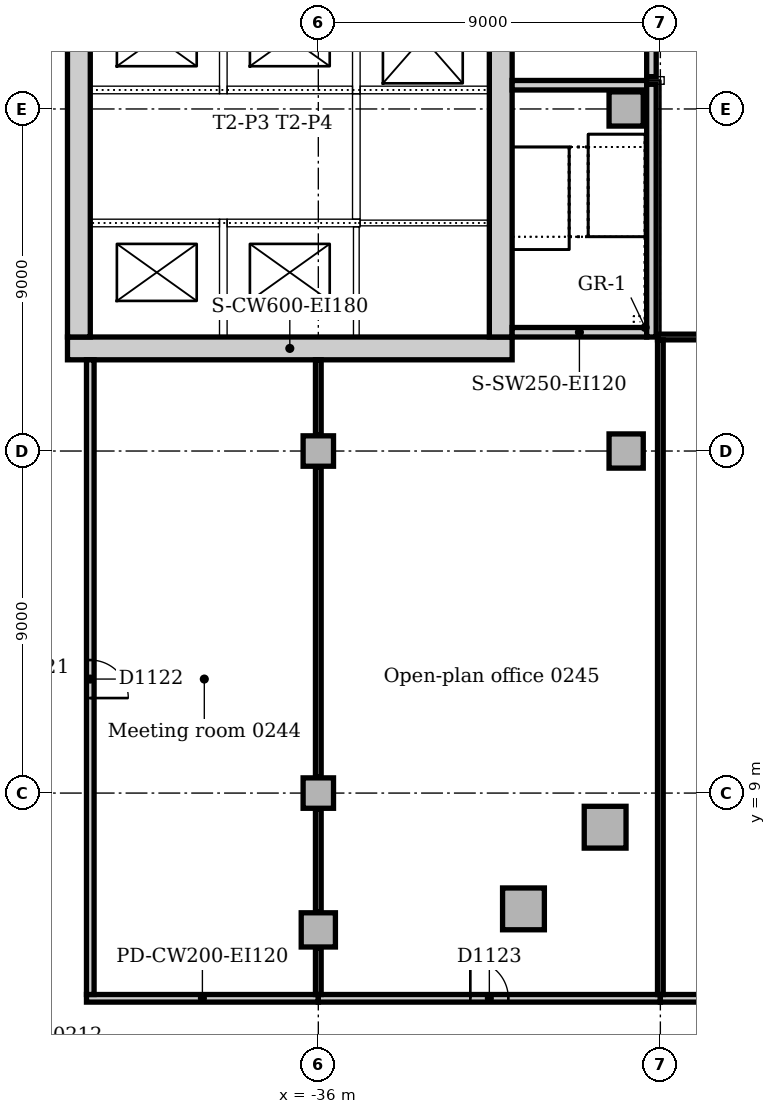
"""IFC4 building model, lengths in metres.
Left out: names, types, materials, properties, quantities, classifications, styles, units other than length and angle.
Written with IfcOpenShell. Run it as: python <this file> out.ifc"""

import sys

from ifc_helpers import new_model, si_unit, direction, frame, frame_2d, origin, origin_2d, place, context, subcontext, project, spatial, rectangle, extrude, element, fill, save


model = new_model("IFC4")
c1 = context("Model", 3, precision=1e-05, world=origin(), true_north=direction((0.0, 1.0)))
c2 = subcontext(c1, "Body", "Model", "MODEL_VIEW")
j1 = project(units=[si_unit("LENGTHUNIT", "METRE"), si_unit("PLANEANGLEUNIT", "RADIAN")], contexts=[c1])
p1 = place(None, origin())
s1 = spatial("IfcSite", under=j1, at=p1, CompositionType="ELEMENT")
p2 = place(p1, origin())
s2 = spatial("IfcBuilding", under=s1, at=p2, CompositionType="ELEMENT")
p3 = place(p2, frame((0.0, 0.0, 11.0)))
s3 = spatial("IfcBuildingStorey", under=s2, at=p3, CompositionType="ELEMENT", Elevation=11.0)
p4 = place(p3, frame((-42.6, 20.7, 0.0), z_axis=(0.0, 0.0, 1.0), x_axis=(1.0, 0.0, 0.0)))
e1 = element("IfcWall", 1, at=p4, inside=s3, PredefinedType="SOLIDWALL", context=c2, shape_type="SweptSolid", body=[
    extrude(rectangle(XDim=11.7, YDim=0.6, at=frame_2d((5.85, 0.0))), origin(), (0.0, 0.0, 1.0), 5.0),
])
p5 = place(p3, frame((-31.2, 21.0, 0.0), z_axis=(0.0, 0.0, 1.0), x_axis=(0.0, 1.0, 0.0)))
e2 = element("IfcWall", 2, at=p5, inside=s3, PredefinedType="SOLIDWALL", context=c2, shape_type="SweptSolid", body=[
    extrude(rectangle(XDim=9.5, YDim=0.6, at=frame_2d((4.75, 0.0))), origin(), (0.0, 0.0, 1.0), 5.0),
])
p6 = place(p5, frame((5.25, 0.0, 0.0)))
e3 = element("IfcOpeningElement", 3, at=p6, cuts=e2, PredefinedType="OPENING", context=c2, shape_type="SweptSolid", body=[
    extrude(rectangle(XDim=1.0, YDim=2.1, at=frame_2d((0.5, 1.05))), frame((0.0, 0.31, 0.0), z_axis=(0.0, -1.0, 0.0), x_axis=(1.0, 0.0, 0.0)), (0.0, 0.0, 1.0), 0.62),
])
p7 = place(p3, frame((-42.3, 30.5, 0.0), z_axis=(0.0, 0.0, 1.0), x_axis=(0.0, -1.0, 0.0)))
e4 = element("IfcWall", 4, at=p7, inside=s3, PredefinedType="SOLIDWALL", context=c2, shape_type="SweptSolid", body=[
    extrude(rectangle(XDim=9.5, YDim=0.6, at=frame_2d((4.75, 0.0))), origin(), (0.0, 0.0, 1.0), 5.0),
])
p8 = place(p7, frame((3.85, 0.0, 0.0)))
e5 = element("IfcOpeningElement", 5, at=p8, cuts=e4, PredefinedType="OPENING", context=c2, shape_type="SweptSolid", body=[
    extrude(rectangle(XDim=1.8, YDim=2.1, at=frame_2d((0.9, 1.05))), frame((0.0, 0.31, 0.0), z_axis=(0.0, -1.0, 0.0), x_axis=(1.0, 0.0, 0.0)), (0.0, 0.0, 1.0), 0.62),
])
p9 = place(p3, frame((-30.9, 21.125, 0.0), z_axis=(0.0, 0.0, 1.0), x_axis=(1.0, 0.0, 0.0)))
e6 = element("IfcWall", 6, at=p9, inside=s3, PredefinedType="SOLIDWALL", context=c2, shape_type="SweptSolid", body=[
    extrude(rectangle(XDim=3.54, YDim=0.25, at=frame_2d((1.77, 0.0))), origin(), (0.0, 0.0, 1.0), 5.0),
])
p10 = place(p3, frame((-27.36, 27.625, 0.0), z_axis=(0.0, 0.0, 1.0), x_axis=(-1.0, 0.0, 0.0)))
e7 = element("IfcWall", 7, at=p10, inside=s3, PredefinedType="SOLIDWALL", context=c2, shape_type="SweptSolid", body=[
    extrude(rectangle(XDim=3.54, YDim=0.25, at=frame_2d((1.77, 0.0))), origin(), (0.0, 0.0, 1.0), 5.0),
])
p11 = place(p10, frame((1.69, 0.0, 0.0)))
e8 = element("IfcOpeningElement", 8, at=p11, cuts=e7, PredefinedType="OPENING", context=c2, shape_type="SweptSolid", body=[
    extrude(rectangle(XDim=1.1, YDim=2.1, at=frame_2d((0.55, 1.05))), frame((0.0, 0.135, 0.0), z_axis=(0.0, -1.0, 0.0), x_axis=(1.0, 0.0, 0.0)), (0.0, 0.0, 1.0), 0.27),
])
p12 = place(p3, frame((-27.235, 21.0, 0.0), z_axis=(0.0, 0.0, 1.0), x_axis=(0.0, 1.0, 0.0)))
e9 = element("IfcWall", 9, at=p12, inside=s3, PredefinedType="SOLIDWALL", context=c2, shape_type="SweptSolid", body=[
    extrude(rectangle(XDim=6.65, YDim=0.25, at=frame_2d((3.325, 0.0))), origin(), (0.0, 0.0, 1.0), 5.0),
])
p13 = place(p3, frame((-27.235, 27.85, 0.0), z_axis=(0.0, 0.0, 1.0), x_axis=(0.0, 1.0, 0.0)))
e10 = element("IfcWall", 10, at=p13, inside=s3, PredefinedType="SOLIDWALL", context=c2, shape_type="SweptSolid", body=[
    extrude(rectangle(XDim=7.3, YDim=0.25, at=frame_2d((3.65, 0.0))), origin(), (0.0, 0.0, 1.0), 5.0),
])
for number, where, z_axis, x_axis in (
    (11, (-30.602, 5.953, 0.0), (0.0, 0.0, 1.0), (1.0, 0.0, 0.0)),
    (12, (-28.453, 8.102, 0.0), (0.0, 0.0, 1.0), (1.0, 0.0, 0.0)),
):
    element("IfcColumn", number, at=place(p3, frame(where, z_axis=z_axis, x_axis=x_axis)), inside=s3, PredefinedType="COLUMN", context=c2, shape_type="SweptSolid", body=[
        extrude(rectangle(XDim=1.1, YDim=1.1, at=origin_2d()), origin(), (0.0, 0.0, 1.0), 4.7),
    ])
for number, where, z_axis, x_axis in (
    (13, (-36.0, 5.4, 0.0), (0.0, 0.0, 1.0), (1.0, 0.0, 0.0)),
    (14, (-27.9, 18.0, 0.0), (0.0, 0.0, 1.0), (1.0, 0.0, 0.0)),
):
    element("IfcColumn", number, at=place(p3, frame(where, z_axis=z_axis, x_axis=x_axis)), inside=s3, PredefinedType="COLUMN", context=c2, shape_type="SweptSolid", body=[
        extrude(rectangle(XDim=0.9, YDim=0.9, at=origin_2d()), origin(), (0.0, 0.0, 1.0), 4.7),
    ])
p14 = place(p3, frame((-27.9, 27.0, 0.0), z_axis=(0.0, 0.0, 1.0), x_axis=(1.0, 0.0, 0.0)))
e15 = element("IfcColumn", 15, at=p14, inside=s3, PredefinedType="COLUMN", context=c2, shape_type="SweptSolid", body=[
    extrude(rectangle(XDim=0.9, YDim=0.9, at=origin_2d()), origin(), (0.0, 0.0, 1.0), 5.0),
])
for number, where, z_axis, x_axis in (
    (16, (-36.0, 9.0, 0.0), (0.0, 0.0, 1.0), (1.0, 0.0, 0.0)),
    (17, (-36.0, 18.0, 0.0), (0.0, 0.0, 1.0), (1.0, 0.0, 0.0)),
):
    element("IfcColumn", number, at=place(p3, frame(where, z_axis=z_axis, x_axis=x_axis)), inside=s3, PredefinedType="COLUMN", context=c2, shape_type="SweptSolid", body=[
        extrude(rectangle(XDim=0.8, YDim=0.8, at=origin_2d()), origin(), (0.0, 0.0, 1.0), 4.7),
    ])
p15 = place(p3, frame((-42.1, 3.6, 0.0), z_axis=(0.0, 0.0, 1.0), x_axis=(1.0, 0.0, 0.0)))
e18 = element("IfcWall", 18, at=p15, inside=s3, PredefinedType="PARTITIONING", context=c2, shape_type="SweptSolid", body=[
    extrude(rectangle(XDim=6.1, YDim=0.2, at=frame_2d((3.05, 0.0))), origin(), (0.0, 0.0, 1.0), 4.7),
])
p16 = place(p3, frame((-36.0, 3.6, 0.0), z_axis=(0.0, 0.0, 1.0), x_axis=(1.0, 0.0, 0.0)))
e19 = element("IfcWall", 19, at=p16, inside=s3, PredefinedType="PARTITIONING", context=c2, shape_type="SweptSolid", body=[
    extrude(rectangle(XDim=9.0, YDim=0.2, at=frame_2d((4.5, 0.0))), origin(), (0.0, 0.0, 1.0), 4.7),
])
p17 = place(p16, frame((4.0, 0.0, 0.0)))
e20 = element("IfcOpeningElement", 20, at=p17, cuts=e19, PredefinedType="OPENING", context=c2, shape_type="SweptSolid", body=[
    extrude(rectangle(XDim=1.0, YDim=2.1, at=frame_2d((0.5, 1.05))), frame((0.0, 0.11, 0.0), z_axis=(0.0, -1.0, 0.0), x_axis=(1.0, 0.0, 0.0)), (0.0, 0.0, 1.0), 0.22),
])
p18 = place(p3, frame((-42.0, 3.7, 0.0), z_axis=(0.0, 0.0, 1.0), x_axis=(0.0, 1.0, 0.0)))
e21 = element("IfcWall", 21, at=p18, inside=s3, PredefinedType="PARTITIONING", context=c2, shape_type="SweptSolid", body=[
    extrude(rectangle(XDim=16.7, YDim=0.2, at=frame_2d((8.35, 0.0))), origin(), (0.0, 0.0, 1.0), 4.7),
])
p19 = place(p18, frame((7.8, 0.0, 0.0)))
e22 = element("IfcOpeningElement", 22, at=p19, cuts=e21, PredefinedType="OPENING", context=c2, shape_type="SweptSolid", body=[
    extrude(rectangle(XDim=1.0, YDim=2.1, at=frame_2d((0.5, 1.05))), frame((0.0, 0.11, 0.0), z_axis=(0.0, -1.0, 0.0), x_axis=(1.0, 0.0, 0.0)), (0.0, 0.0, 1.0), 0.22),
])
p20 = place(p3, frame((-27.0, 3.6, 0.0), z_axis=(0.0, 0.0, 1.0), x_axis=(1.0, 0.0, 0.0)))
e23 = element("IfcWall", 23, at=p20, inside=s3, PredefinedType="PARTITIONING", context=c2, shape_type="SweptSolid", body=[
    extrude(rectangle(XDim=9.0, YDim=0.2, at=frame_2d((4.5, 0.0))), origin(), (0.0, 0.0, 1.0), 4.7),
])
p21 = place(p20, frame((4.0, 0.0, 0.0)))
e24 = element("IfcOpeningElement", 24, at=p21, cuts=e23, PredefinedType="OPENING", context=c2, shape_type="SweptSolid", body=[
    extrude(rectangle(XDim=1.0, YDim=2.1, at=frame_2d((0.5, 1.05))), frame((0.0, 0.11, 0.0), z_axis=(0.0, -1.0, 0.0), x_axis=(1.0, 0.0, 0.0)), (0.0, 0.0, 1.0), 0.22),
])
p22 = place(p3, frame((-27.075, 21.0, 0.0), z_axis=(0.0, 0.0, 1.0), x_axis=(1.0, 0.0, 0.0)))
e25 = element("IfcWall", 25, at=p22, inside=s3, PredefinedType="PARTITIONING", context=c2, shape_type="SweptSolid", body=[
    extrude(rectangle(XDim=9.075, YDim=0.15, at=frame_2d((4.537, 0.0))), origin(), (0.0, 0.0, 1.0), 4.7),
])
p23 = place(p3, frame((-27.0, 3.7, 0.0), z_axis=(0.0, 0.0, 1.0), x_axis=(0.0, 1.0, 0.0)))
e26 = element("IfcWall", 26, at=p23, inside=s3, PredefinedType="PARTITIONING", context=c2, shape_type="SweptSolid", body=[
    extrude(rectangle(XDim=17.225, YDim=0.15, at=frame_2d((8.613, 0.0))), origin(), (0.0, 0.0, 1.0), 4.7),
])
p24 = place(p3, frame((-36.0, 3.7, 0.0), z_axis=(0.0, 0.0, 1.0), x_axis=(0.0, 1.0, 0.0)))
e27 = element("IfcWall", 27, at=p24, inside=s3, PredefinedType="PARTITIONING", context=c2, shape_type="SweptSolid", body=[
    extrude(rectangle(XDim=1.23, YDim=0.15, at=frame_2d((0.615, 0.0))), origin(), (0.0, 0.0, 1.0), 4.7),
])
p25 = place(p3, frame((-36.0, 5.87, 0.0), z_axis=(0.0, 0.0, 1.0), x_axis=(0.0, 1.0, 0.0)))
e28 = element("IfcWall", 28, at=p25, inside=s3, PredefinedType="PARTITIONING", context=c2, shape_type="SweptSolid", body=[
    extrude(rectangle(XDim=2.71, YDim=0.15, at=frame_2d((1.355, 0.0))), origin(), (0.0, 0.0, 1.0), 4.7),
])
p26 = place(p3, frame((-36.0, 9.42, 0.0), z_axis=(0.0, 0.0, 1.0), x_axis=(0.0, 1.0, 0.0)))
e29 = element("IfcWall", 29, at=p26, inside=s3, PredefinedType="PARTITIONING", context=c2, shape_type="SweptSolid", body=[
    extrude(rectangle(XDim=8.16, YDim=0.15, at=frame_2d((4.08, 0.0))), origin(), (0.0, 0.0, 1.0), 4.7),
])
p27 = place(p3, frame((-36.0, 18.42, 0.0), z_axis=(0.0, 0.0, 1.0), x_axis=(0.0, 1.0, 0.0)))
e30 = element("IfcWall", 30, at=p27, inside=s3, PredefinedType="PARTITIONING", context=c2, shape_type="SweptSolid", body=[
    extrude(rectangle(XDim=1.98, YDim=0.15, at=frame_2d((0.99, 0.0))), origin(), (0.0, 0.0, 1.0), 4.7),
])
p28 = place(p3, frame((-38.5, 21.0, 0.0), z_axis=(0.0, 0.0, 1.0), x_axis=(0.0, 1.0, 0.0)))
e31 = element("IfcWall", 31, at=p28, inside=s3, PredefinedType="SOLIDWALL", context=c2, shape_type="SweptSolid", body=[
    extrude(rectangle(XDim=3.1, YDim=0.2, at=frame_2d((1.55, 0.0))), origin(), (0.0, 0.0, 1.0), 5.0),
])
p29 = place(p3, frame((-38.6, 24.0, 0.0), z_axis=(0.0, 0.0, 1.0), x_axis=(-1.0, 0.0, 0.0)))
e32 = element("IfcWall", 32, at=p29, inside=s3, PredefinedType="SOLIDWALL", context=c2, shape_type="SweptSolid", body=[
    extrude(rectangle(XDim=3.4, YDim=0.2, at=frame_2d((1.7, 0.0))), origin(), (0.0, 0.0, 1.0), 5.0),
])
p30 = place(p29, frame((0.8, 0.0, 0.0)))
e33 = element("IfcOpeningElement", 33, at=p30, cuts=e32, PredefinedType="OPENING", context=c2, shape_type="SweptSolid", body=[
    extrude(rectangle(XDim=1.1, YDim=2.1, at=frame_2d((0.55, 1.05))), frame((0.0, 0.11, 0.0), z_axis=(0.0, -1.0, 0.0), x_axis=(1.0, 0.0, 0.0)), (0.0, 0.0, 1.0), 0.22),
])
p31 = place(p3, frame((-34.9, 24.0, 0.0), z_axis=(0.0, 0.0, 1.0), x_axis=(-1.0, 0.0, 0.0)))
e34 = element("IfcWall", 34, at=p31, inside=s3, PredefinedType="SOLIDWALL", context=c2, shape_type="SweptSolid", body=[
    extrude(rectangle(XDim=3.5, YDim=0.2, at=frame_2d((1.75, 0.0))), origin(), (0.0, 0.0, 1.0), 5.0),
])
p32 = place(p31, frame((1.3, 0.0, 0.0)))
e35 = element("IfcOpeningElement", 35, at=p32, cuts=e34, PredefinedType="OPENING", context=c2, shape_type="SweptSolid", body=[
    extrude(rectangle(XDim=1.1, YDim=2.1, at=frame_2d((0.55, 1.05))), frame((0.0, 0.11, 0.0), z_axis=(0.0, -1.0, 0.0), x_axis=(1.0, 0.0, 0.0)), (0.0, 0.0, 1.0), 0.22),
])
p33 = place(p3, frame((-38.5, 27.4, 0.0), z_axis=(0.0, 0.0, 1.0), x_axis=(0.0, 1.0, 0.0)))
e36 = element("IfcWall", 36, at=p33, inside=s3, PredefinedType="SOLIDWALL", context=c2, shape_type="SweptSolid", body=[
    extrude(rectangle(XDim=2.85, YDim=0.2, at=frame_2d((1.425, 0.0))), origin(), (0.0, 0.0, 1.0), 5.0),
])
p34 = place(p3, frame((-42.0, 27.5, 0.0), z_axis=(0.0, 0.0, 1.0), x_axis=(1.0, 0.0, 0.0)))
e37 = element("IfcWall", 37, at=p34, inside=s3, PredefinedType="SOLIDWALL", context=c2, shape_type="SweptSolid", body=[
    extrude(rectangle(XDim=3.4, YDim=0.2, at=frame_2d((1.7, 0.0))), origin(), (0.0, 0.0, 1.0), 5.0),
])
p35 = place(p34, frame((1.5, 0.0, 0.0)))
e38 = element("IfcOpeningElement", 38, at=p35, cuts=e37, PredefinedType="OPENING", context=c2, shape_type="SweptSolid", body=[
    extrude(rectangle(XDim=1.1, YDim=2.1, at=frame_2d((0.55, 1.05))), frame((0.0, 0.11, 0.0), z_axis=(0.0, -1.0, 0.0), x_axis=(1.0, 0.0, 0.0)), (0.0, 0.0, 1.0), 0.22),
])
p36 = place(p3, frame((-35.0, 27.4, 0.0), z_axis=(0.0, 0.0, 1.0), x_axis=(0.0, 1.0, 0.0)))
e39 = element("IfcWall", 39, at=p36, inside=s3, PredefinedType="SOLIDWALL", context=c2, shape_type="SweptSolid", body=[
    extrude(rectangle(XDim=2.85, YDim=0.2, at=frame_2d((1.425, 0.0))), origin(), (0.0, 0.0, 1.0), 5.0),
])
p37 = place(p3, frame((-38.4, 27.5, 0.0), z_axis=(0.0, 0.0, 1.0), x_axis=(1.0, 0.0, 0.0)))
e40 = element("IfcWall", 40, at=p37, inside=s3, PredefinedType="SOLIDWALL", context=c2, shape_type="SweptSolid", body=[
    extrude(rectangle(XDim=3.3, YDim=0.2, at=frame_2d((1.65, 0.0))), origin(), (0.0, 0.0, 1.0), 5.0),
])
p38 = place(p37, frame((1.1, 0.0, 0.0)))
e41 = element("IfcOpeningElement", 41, at=p38, cuts=e40, PredefinedType="OPENING", context=c2, shape_type="SweptSolid", body=[
    extrude(rectangle(XDim=1.1, YDim=2.1, at=frame_2d((0.55, 1.05))), frame((0.0, 0.11, 0.0), z_axis=(0.0, -1.0, 0.0), x_axis=(1.0, 0.0, 0.0)), (0.0, 0.0, 1.0), 0.22),
])
p39 = place(p3, frame((-34.9, 27.5, 0.0), z_axis=(0.0, 0.0, 1.0), x_axis=(1.0, 0.0, 0.0)))
e42 = element("IfcWall", 42, at=p39, inside=s3, PredefinedType="SOLIDWALL", context=c2, shape_type="SweptSolid", body=[
    extrude(rectangle(XDim=3.4, YDim=0.2, at=frame_2d((1.7, 0.0))), origin(), (0.0, 0.0, 1.0), 5.0),
])
p40 = place(p39, frame((1.1, 0.0, 0.0)))
e43 = element("IfcOpeningElement", 43, at=p40, cuts=e42, PredefinedType="OPENING", context=c2, shape_type="SweptSolid", body=[
    extrude(rectangle(XDim=1.1, YDim=2.1, at=frame_2d((0.55, 1.05))), frame((0.0, 0.11, 0.0), z_axis=(0.0, -1.0, 0.0), x_axis=(1.0, 0.0, 0.0)), (0.0, 0.0, 1.0), 0.22),
])
p41 = place(p3, frame((-35.0, 24.1, 0.0), z_axis=(0.0, 0.0, 1.0), x_axis=(0.0, 1.0, 0.0)))
e44 = element("IfcWall", 44, at=p41, inside=s3, PredefinedType="SOLIDWALL", context=c2, shape_type="SweptSolid", body=[
    extrude(rectangle(XDim=3.3, YDim=0.2, at=frame_2d((1.65, 0.0))), origin(), (0.0, 0.0, 1.0), 5.0),
])
p42 = place(p41, frame((1.15, 0.0, 0.0)))
e45 = element("IfcOpeningElement", 45, at=p42, cuts=e44, PredefinedType="OPENING", context=c2, shape_type="SweptSolid", body=[
    extrude(rectangle(XDim=1.0, YDim=2.1, at=frame_2d((0.5, 1.05))), frame((0.0, 0.11, 0.0), z_axis=(0.0, -1.0, 0.0), x_axis=(1.0, 0.0, 0.0)), (0.0, 0.0, 1.0), 0.22),
])
p43 = place(p3, frame((-27.36, 27.75, 0.0), z_axis=(0.0, 0.0, 1.0), x_axis=(1.0, 0.0, 0.0)))
e46 = element("IfcWall", 46, at=p43, inside=s3, PredefinedType="SOLIDWALL", context=c2, shape_type="SweptSolid", body=[
    extrude(rectangle(XDim=0.46, YDim=0.2, at=frame_2d((0.23, 0.0))), origin(), (0.0, 0.0, 1.0), 5.0),
])
p44 = place(p3, frame((-35.0, 21.0, 0.0), z_axis=(0.0, 0.0, 1.0), x_axis=(0.0, 1.0, 0.0)))
e47 = element("IfcWall", 47, at=p44, inside=s3, PredefinedType="SOLIDWALL", context=c2, shape_type="SweptSolid", body=[
    extrude(rectangle(XDim=2.9, YDim=0.15, at=frame_2d((1.45, 0.0))), origin(), (0.0, 0.0, 1.0), 5.0),
])
p45 = place(p3, frame((-31.5, 24.0, 0.0), z_axis=(0.0, 0.0, 1.0), x_axis=(-1.0, 0.0, 0.0)))
e48 = element("IfcWall", 48, at=p45, inside=s3, PredefinedType="SOLIDWALL", context=c2, shape_type="SweptSolid", body=[
    extrude(rectangle(XDim=3.4, YDim=0.15, at=frame_2d((1.7, 0.0))), origin(), (0.0, 0.0, 1.0), 5.0),
])
p46 = place(p19, frame((1.0, 0.0, 0.0), z_axis=(0.0, 0.0, 1.0), x_axis=(-1.0, 0.0, 0.0)))
e49 = element("IfcDoor", 49, at=p46, inside=s3, OperationType="SINGLE_SWING_RIGHT", PredefinedType="DOOR", context=c2, shape_type="SweptSolid", body=[
    extrude(rectangle(XDim=1.0, YDim=2.1, at=frame_2d((0.5, 1.05))), frame((0.0, 0.025, 0.0), z_axis=(0.0, -1.0, 0.0), x_axis=(1.0, 0.0, 0.0)), (0.0, 0.0, 1.0), 0.05),
])
fill(e22, e49)
p47 = place(p17, origin())
e50 = element("IfcDoor", 50, at=p47, inside=s3, OperationType="SINGLE_SWING_LEFT", PredefinedType="DOOR", context=c2, shape_type="SweptSolid", body=[
    extrude(rectangle(XDim=1.0, YDim=2.1, at=frame_2d((0.5, 1.05))), frame((0.0, 0.025, 0.0), z_axis=(0.0, -1.0, 0.0), x_axis=(1.0, 0.0, 0.0)), (0.0, 0.0, 1.0), 0.05),
])
fill(e20, e50)
p48 = place(p30, origin())
e51 = element("IfcDoor", 51, at=p48, inside=s3, OperationType="SLIDING_TO_LEFT", PredefinedType="DOOR", context=c2, shape_type="SweptSolid", body=[
    extrude(rectangle(XDim=1.1, YDim=2.1, at=frame_2d((0.55, 1.05))), frame((0.0, 0.025, 0.0), z_axis=(0.0, -1.0, 0.0), x_axis=(1.0, 0.0, 0.0)), (0.0, 0.0, 1.0), 0.05),
])
fill(e33, e51)
p49 = place(p32, origin())
e52 = element("IfcDoor", 52, at=p49, inside=s3, OperationType="SLIDING_TO_LEFT", PredefinedType="DOOR", context=c2, shape_type="SweptSolid", body=[
    extrude(rectangle(XDim=1.1, YDim=2.1, at=frame_2d((0.55, 1.05))), frame((0.0, 0.025, 0.0), z_axis=(0.0, -1.0, 0.0), x_axis=(1.0, 0.0, 0.0)), (0.0, 0.0, 1.0), 0.05),
])
fill(e35, e52)
p50 = place(p35, origin())
e53 = element("IfcDoor", 53, at=p50, inside=s3, OperationType="SLIDING_TO_LEFT", PredefinedType="DOOR", context=c2, shape_type="SweptSolid", body=[
    extrude(rectangle(XDim=1.1, YDim=2.1, at=frame_2d((0.55, 1.05))), frame((0.0, 0.025, 0.0), z_axis=(0.0, -1.0, 0.0), x_axis=(1.0, 0.0, 0.0)), (0.0, 0.0, 1.0), 0.05),
])
fill(e38, e53)
p51 = place(p38, origin())
e54 = element("IfcDoor", 54, at=p51, inside=s3, OperationType="SLIDING_TO_LEFT", PredefinedType="DOOR", context=c2, shape_type="SweptSolid", body=[
    extrude(rectangle(XDim=1.1, YDim=2.1, at=frame_2d((0.55, 1.05))), frame((0.0, 0.025, 0.0), z_axis=(0.0, -1.0, 0.0), x_axis=(1.0, 0.0, 0.0)), (0.0, 0.0, 1.0), 0.05),
])
fill(e41, e54)
p52 = place(p40, origin())
e55 = element("IfcDoor", 55, at=p52, inside=s3, OperationType="SLIDING_TO_LEFT", PredefinedType="DOOR", context=c2, shape_type="SweptSolid", body=[
    extrude(rectangle(XDim=1.1, YDim=2.1, at=frame_2d((0.55, 1.05))), frame((0.0, 0.025, 0.0), z_axis=(0.0, -1.0, 0.0), x_axis=(1.0, 0.0, 0.0)), (0.0, 0.0, 1.0), 0.05),
])
fill(e43, e55)
p53 = place(p42, origin())
e56 = element("IfcDoor", 56, at=p53, inside=s3, OperationType="SINGLE_SWING_RIGHT", PredefinedType="DOOR", context=c2, shape_type="SweptSolid", body=[
    extrude(rectangle(XDim=1.0, YDim=2.1, at=frame_2d((0.5, 1.05))), frame((0.0, 0.025, 0.0), z_axis=(0.0, -1.0, 0.0), x_axis=(1.0, 0.0, 0.0)), (0.0, 0.0, 1.0), 0.05),
])
fill(e45, e56)
p54 = place(p6, frame((1.0, 0.0, 0.0), z_axis=(0.0, 0.0, 1.0), x_axis=(-1.0, 0.0, 0.0)))
e57 = element("IfcDoor", 57, at=p54, inside=s3, OperationType="SINGLE_SWING_LEFT", PredefinedType="DOOR", context=c2, shape_type="SweptSolid", body=[
    extrude(rectangle(XDim=1.0, YDim=2.1, at=frame_2d((0.5, 1.05))), frame((0.0, 0.025, 0.0), z_axis=(0.0, -1.0, 0.0), x_axis=(1.0, 0.0, 0.0)), (0.0, 0.0, 1.0), 0.05),
])
fill(e3, e57)
p55 = place(p11, origin())
e58 = element("IfcDoor", 58, at=p55, inside=s3, OperationType="SINGLE_SWING_RIGHT", PredefinedType="DOOR", context=c2, shape_type="SweptSolid", body=[
    extrude(rectangle(XDim=1.1, YDim=2.1, at=frame_2d((0.55, 1.05))), frame((0.0, 0.025, 0.0), z_axis=(0.0, -1.0, 0.0), x_axis=(1.0, 0.0, 0.0)), (0.0, 0.0, 1.0), 0.05),
])
fill(e8, e58)
p56 = place(p8, origin())
e59 = element("IfcDoor", 59, at=p56, inside=s3, OperationType="DOUBLE_DOOR_SINGLE_SWING", PredefinedType="DOOR", context=c2, shape_type="SweptSolid", body=[
    extrude(rectangle(XDim=1.8, YDim=2.1, at=frame_2d((0.9, 1.05))), frame((0.0, 0.025, 0.0), z_axis=(0.0, -1.0, 0.0), x_axis=(1.0, 0.0, 0.0)), (0.0, 0.0, 1.0), 0.05),
])
fill(e5, e59)
save(model, sys.argv[1])
